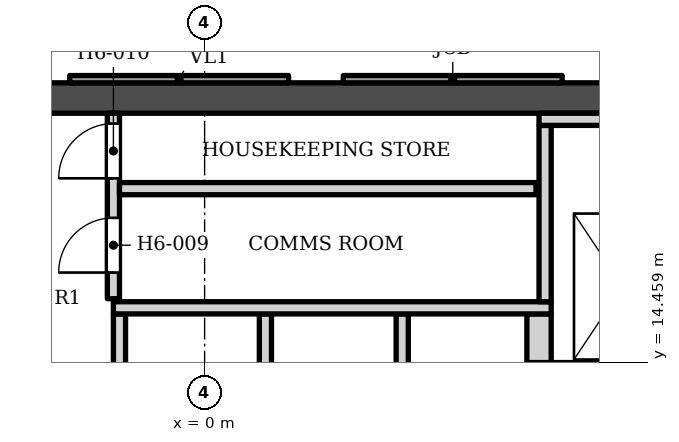
"""IFC4 building model, lengths in metres.
Left out: names, types, materials, properties, quantities, classifications, styles, units other than length and angle.
Written with IfcOpenShell. Run it as: python <this file> out.ifc"""

import sys

from ifc_helpers import new_model, si_unit, direction, frame, frame_2d, origin, place, context, subcontext, project, spatial, polyline, rectangle, outline, extrude, element, fill, save


model = new_model("IFC4")
c1 = context("Model", 3, precision=1e-05, world=origin(), true_north=direction((0.0, 1.0)))
c2 = subcontext(c1, "Body", "Model", "MODEL_VIEW")
j1 = project(units=[si_unit("LENGTHUNIT", "METRE"), si_unit("PLANEANGLEUNIT", "RADIAN")], contexts=[c1])
p1 = place(None, origin())
s1 = spatial("IfcSite", under=j1, at=p1, CompositionType="ELEMENT")
p2 = place(p1, origin())
s2 = spatial("IfcBuilding", under=s1, at=p2, CompositionType="ELEMENT")
p3 = place(p2, frame((0.0, 0.0, 102.0)))
s3 = spatial("IfcBuildingStorey", under=s2, at=p3, CompositionType="ELEMENT", Elevation=102.0)
p4 = place(p3, frame((-16.9, 18.802, 0.0), z_axis=(0.0, 0.0, 1.0), x_axis=(1.0, 0.0, 0.0)))
e1 = element("IfcWall", 1, at=p4, inside=s3, PredefinedType="SHEAR", context=c2, shape_type="SweptSolid", body=[
    extrude(rectangle(XDim=33.8, YDim=0.5, at=frame_2d((16.9, 0.0))), origin(), (0.0, 0.0, 1.0), 3.4),
])
p5 = place(p3, origin())
e2 = element("IfcWall", 2, at=p5, inside=s3, PredefinedType="SOLIDWALL", context=c2, shape_type="SweptSolid", body=[
    extrude(outline(polyline([(2.281, 19.173), (2.281, 19.052), (5.881, 19.052), (5.881, 19.173), (2.281, 19.173)])), origin(), (0.0, 0.0, 1.0), 2.65),
])
p6 = place(p3, origin())
e3 = element("IfcWall", 3, at=p6, inside=s3, PredefinedType="ELEMENTEDWALL", context=c2, shape_type="SweptSolid", body=[
    extrude(outline(polyline([(-2.219, 19.173), (-2.219, 19.052), (1.381, 19.052), (1.381, 19.173), (-2.219, 19.173)])), origin(), (0.0, 0.0, 1.0), 2.65),
])
for number, where, z_axis, x_axis in (
    (4, (-1.4, 12.653, 0.0), (0.0, 0.0, 1.0), (0.0, 1.0, 0.0)),
    (5, (1.0, 12.653, 0.0), (0.0, 0.0, 1.0), (0.0, 1.0, 0.0)),
    (6, (3.25, 12.653, 0.0), (0.0, 0.0, 1.0), (0.0, 1.0, 0.0)),
):
    element("IfcWall", number, at=place(p3, frame(where, z_axis=z_axis, x_axis=x_axis)), inside=s3, PredefinedType="SOLIDWALL", context=c2, shape_type="SweptSolid", body=[
        extrude(rectangle(XDim=2.6, YDim=0.2, at=frame_2d((1.3, 0.0))), origin(), (0.0, 0.0, 1.0), 3.23),
    ])
p7 = place(p3, frame((5.5, 14.453, 0.0), z_axis=(0.0, 0.0, 1.0), x_axis=(0.0, 1.0, 0.0)))
e7 = element("IfcWall", 7, at=p7, inside=s3, PredefinedType="SOLIDWALL", context=c2, shape_type="SweptSolid", body=[
    extrude(rectangle(XDim=0.8, YDim=0.4, at=frame_2d((0.4, 0.0))), origin(), (0.0, 0.0, 1.0), 3.23),
])
p8 = place(p3, frame((-1.5, 15.353, 0.0), z_axis=(0.0, 0.0, 1.0), x_axis=(1.0, 0.0, 0.0)))
e8 = element("IfcWall", 8, at=p8, inside=s3, PredefinedType="SOLIDWALL", context=c2, shape_type="SweptSolid", body=[
    extrude(rectangle(XDim=7.2, YDim=0.2, at=frame_2d((3.6, 0.0))), origin(), (0.0, 0.0, 1.0), 3.23),
])
p9 = place(p3, frame((5.6, 15.453, 0.0), z_axis=(0.0, 0.0, 1.0), x_axis=(0.0, 1.0, 0.0)))
e9 = element("IfcWall", 9, at=p9, inside=s3, PredefinedType="SOLIDWALL", context=c2, shape_type="SweptSolid", body=[
    extrude(rectangle(XDim=2.9, YDim=0.2, at=frame_2d((1.45, 0.0))), origin(), (0.0, 0.0, 1.0), 3.23),
])
p10 = place(p3, frame((-1.5, 15.503, 0.0), z_axis=(0.0, 0.0, 1.0), x_axis=(0.0, 1.0, 0.0)))
e10 = element("IfcWall", 10, at=p10, inside=s3, PredefinedType="SOLIDWALL", context=c2, shape_type="SweptSolid", body=[
    extrude(rectangle(XDim=3.05, YDim=0.2, at=frame_2d((1.525, 0.0))), origin(), (0.0, 0.0, 1.0), 3.23),
])
p11 = place(p10, frame((0.43, 0.0, 0.0)))
e11 = element("IfcOpeningElement", 11, at=p11, cuts=e10, PredefinedType="OPENING", context=c2, shape_type="SweptSolid", body=[
    extrude(rectangle(XDim=0.9, YDim=2.1, at=frame_2d((0.45, 1.05))), frame((0.0, 0.11, 0.0), z_axis=(0.0, -1.0, 0.0), x_axis=(1.0, 0.0, 0.0)), (0.0, 0.0, 1.0), 0.22),
])
p12 = place(p10, frame((1.98, 0.0, 0.0)))
e12 = element("IfcOpeningElement", 12, at=p12, cuts=e10, PredefinedType="OPENING", context=c2, shape_type="SweptSolid", body=[
    extrude(rectangle(XDim=0.9, YDim=2.1, at=frame_2d((0.45, 1.05))), frame((0.0, 0.11, 0.0), z_axis=(0.0, -1.0, 0.0), x_axis=(1.0, 0.0, 0.0)), (0.0, 0.0, 1.0), 0.22),
])
p13 = place(p3, frame((-1.4, 17.312, 0.0), z_axis=(0.0, 0.0, 1.0), x_axis=(1.0, 0.0, 0.0)))
e13 = element("IfcWall", 13, at=p13, inside=s3, PredefinedType="SOLIDWALL", context=c2, shape_type="SweptSolid", body=[
    extrude(rectangle(XDim=6.85, YDim=0.2, at=frame_2d((3.425, 0.0))), origin(), (0.0, 0.0, 1.0), 3.23),
])
p14 = place(p3, frame((5.5, 18.453, 0.0), z_axis=(0.0, 0.0, 1.0), x_axis=(1.0, 0.0, 0.0)))
e14 = element("IfcWall", 14, at=p14, inside=s3, PredefinedType="SOLIDWALL", context=c2, shape_type="SweptSolid", body=[
    extrude(rectangle(XDim=2.55, YDim=0.2, at=frame_2d((1.275, 0.0))), origin(), (0.0, 0.0, 1.0), 3.23),
])
p15 = place(p11, origin())
e15 = element("IfcDoor", 15, at=p15, inside=s3, OperationType="SINGLE_SWING_LEFT", PredefinedType="DOOR", context=c2, shape_type="SweptSolid", body=[
    extrude(rectangle(XDim=0.9, YDim=2.1, at=frame_2d((0.45, 1.05))), frame((0.0, 0.025, 0.0), z_axis=(0.0, -1.0, 0.0), x_axis=(1.0, 0.0, 0.0)), (0.0, 0.0, 1.0), 0.05),
])
fill(e11, e15)
p16 = place(p12, origin())
e16 = element("IfcDoor", 16, at=p16, inside=s3, OperationType="SINGLE_SWING_LEFT", PredefinedType="DOOR", context=c2, shape_type="SweptSolid", body=[
    extrude(rectangle(XDim=0.9, YDim=2.1, at=frame_2d((0.45, 1.05))), frame((0.0, 0.025, 0.0), z_axis=(0.0, -1.0, 0.0), x_axis=(1.0, 0.0, 0.0)), (0.0, 0.0, 1.0), 0.05),
])
fill(e12, e16)
save(model, sys.argv[1])
